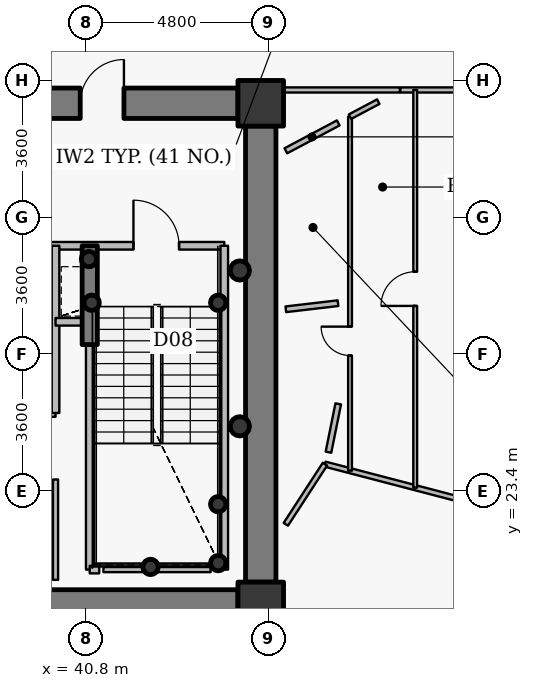
"""IFC4 building model, lengths in metres.
Left out: names, types, materials, properties, quantities, classifications, styles, units other than length and angle.
Written with IfcOpenShell. Run it as: python <this file> out.ifc"""

import sys

from ifc_helpers import new_model, si_unit, direction, frame, frame_2d, origin, origin_2d, place, context, subcontext, project, spatial, rectangle, hollow_circle, extrude, source, transform, mapped, element, fill, save


model = new_model("IFC4")
c1 = context("Model", 3, precision=1e-05, world=origin(), true_north=direction((0.0, 1.0)))
c2 = subcontext(c1, "Body", "Model", "MODEL_VIEW")
j1 = project(units=[si_unit("LENGTHUNIT", "METRE"), si_unit("PLANEANGLEUNIT", "RADIAN")], contexts=[c1])
p1 = place(None, origin())
s1 = spatial("IfcSite", under=j1, at=p1, CompositionType="ELEMENT")
p2 = place(p1, origin())
s2 = spatial("IfcBuilding", under=s1, at=p2, CompositionType="ELEMENT")
p3 = place(p2, frame((0.0, 0.0, 174.9)))
s3 = spatial("IfcBuildingStorey", under=s2, at=p3, CompositionType="ELEMENT", Elevation=174.9)
for number, where, z_axis, x_axis in (
    (1, (45.4, 20.4, 0.0), (0.0, 0.0, 1.0), (1.0, 0.0, 0.0)),
    (2, (45.4, 33.6, 0.0), (0.0, 0.0, 1.0), (1.0, 0.0, 0.0)),
):
    element("IfcColumn", number, at=place(p3, frame(where, z_axis=z_axis, x_axis=x_axis)), inside=s3, PredefinedType="COLUMN", context=c2, shape_type="SweptSolid", body=[
        extrude(rectangle(XDim=1.2, YDim=1.2, at=origin_2d()), origin(), (0.0, 0.0, 1.0), 3.75),
    ])
for number, where, z_axis, x_axis in (
    (3, (44.28, 21.5, 0.0), (0.0, 0.0, 1.0), (1.0, 0.0, 0.0)),
    (4, (44.28, 23.05, 0.0), (0.0, 0.0, 1.0), (1.0, 0.0, 0.0)),
    (5, (42.5, 21.4, 0.0), (0.0, 0.0, 1.0), (1.0, 0.0, 0.0)),
    (6, (40.95, 28.35, 0.0), (0.0, 0.0, 1.0), (1.0, 0.0, 0.0)),
    (7, (44.28, 28.35, 0.0), (0.0, 0.0, 1.0), (1.0, 0.0, 0.0)),
    (8, (40.88, 29.5, 0.0), (0.0, 0.0, 1.0), (1.0, 0.0, 0.0)),
):
    element("IfcColumn", number, at=place(p3, frame(where, z_axis=z_axis, x_axis=x_axis)), inside=s3, PredefinedType="COLUMN", context=c2, shape_type="SweptSolid", body=[
        extrude(hollow_circle(Radius=0.203, WallThickness=0.016, at=origin_2d()), origin(), (0.0, 0.0, 1.0), 3.75),
    ])
p4 = place(p3, frame((27.2, 33.6, 0.0), z_axis=(0.0, 0.0, 1.0), x_axis=(1.0, 0.0, 0.0)))
e9 = element("IfcWall", 9, at=p4, inside=s3, PredefinedType="SHEAR", context=c2, shape_type="SweptSolid", body=[
    extrude(rectangle(XDim=17.6, YDim=0.8, at=frame_2d((8.8, 0.0))), origin(), (0.0, 0.0, 1.0), 2.95),
])
p5 = place(p4, frame((13.45, 0.0, 0.0)))
e10 = element("IfcOpeningElement", 10, at=p5, cuts=e9, PredefinedType="OPENING", context=c2, shape_type="SweptSolid", body=[
    extrude(rectangle(XDim=1.15, YDim=2.15, at=origin_2d()), frame((0.575, 0.41, 1.075), z_axis=(0.0, -1.0, 0.0), x_axis=(1.0, 0.0, 0.0)), (0.0, 0.0, 1.0), 0.82),
])
p6 = place(p3, frame((45.4, 33.0, 0.0), z_axis=(0.0, 0.0, 1.0), x_axis=(0.0, -1.0, 0.0)))
e11 = element("IfcWall", 11, at=p6, inside=s3, PredefinedType="SHEAR", context=c2, shape_type="SweptSolid", body=[
    extrude(rectangle(XDim=12.0, YDim=0.8, at=frame_2d((6.0, 0.0))), origin(), (0.0, 0.0, 1.0), 2.95),
])
p7 = place(p3, frame((44.8, 20.4, 0.0), z_axis=(0.0, 0.0, 1.0), x_axis=(-1.0, 0.0, 0.0)))
e12 = element("IfcWall", 12, at=p7, inside=s3, PredefinedType="SHEAR", context=c2, shape_type="SweptSolid", body=[
    extrude(rectangle(XDim=17.6, YDim=0.8, at=frame_2d((8.8, 0.0))), origin(), (0.0, 0.0, 1.0), 2.95),
])
p8 = place(p7, frame((9.55, 0.0, 0.0)))
e13 = element("IfcOpeningElement", 13, at=p8, cuts=e12, PredefinedType="OPENING", context=c2, shape_type="SweptSolid", body=[
    extrude(rectangle(XDim=1.15, YDim=2.15, at=origin_2d()), frame((0.575, 0.41, 1.075), z_axis=(0.0, -1.0, 0.0), x_axis=(1.0, 0.0, 0.0)), (0.0, 0.0, 1.0), 0.82),
])
p9 = place(p3, frame((40.9, 27.25, 0.0), z_axis=(0.0, 0.0, 1.0), x_axis=(0.0, 1.0, 0.0)))
e14 = element("IfcWall", 14, at=p9, inside=s3, PredefinedType="SHEAR", context=c2, shape_type="SweptSolid", body=[
    extrude(rectangle(XDim=2.6, YDim=0.4, at=frame_2d((1.3, 0.0))), origin(), (0.0, 0.0, 1.0), 3.1),
])
for number, where, z_axis, x_axis in (
    (15, (44.85, 25.1, 0.0), (0.0, 0.0, 1.0), (1.0, 0.0, 0.0)),
    (16, (44.85, 29.2, 0.0), (0.0, 0.0, 1.0), (1.0, 0.0, 0.0)),
):
    element("IfcColumn", number, at=place(p3, frame(where, z_axis=z_axis, x_axis=x_axis)), inside=s3, PredefinedType="COLUMN", context=c2, shape_type="SweptSolid", body=[
        extrude(hollow_circle(Radius=0.254, WallThickness=0.02, at=origin_2d()), origin(), (0.0, 0.0, 1.0), 3.75),
    ])
p10 = place(p3, frame((35.05, 27.25, 0.0), z_axis=(0.0, 0.0, 1.0), x_axis=(1.0, 0.0, 0.0)))
e17 = element("IfcWall", 17, at=p10, inside=s3, PredefinedType="PARTITIONING", context=c2, shape_type="SweptSolid", body=[
    extrude(rectangle(XDim=4.95, YDim=0.2, at=frame_2d((2.475, 0.0))), origin(), (0.0, 0.0, 1.0), 3.085),
])
p11 = place(p3, frame((35.45, 25.45, 0.0), z_axis=(0.0, 0.0, 1.0), x_axis=(1.0, 0.0, 0.0)))
e18 = element("IfcWall", 18, at=p11, inside=s3, PredefinedType="PARTITIONING", context=c2, shape_type="SweptSolid", body=[
    extrude(rectangle(XDim=4.55, YDim=0.2, at=frame_2d((2.275, 0.0))), origin(), (0.0, 0.0, 1.0), 3.085),
])
p12 = place(p3, frame((35.95, 29.85, 0.0), z_axis=(0.0, 0.0, 1.0), x_axis=(1.0, 0.0, 0.0)))
e19 = element("IfcWall", 19, at=p12, inside=s3, PredefinedType="PARTITIONING", context=c2, shape_type="SweptSolid", body=[
    extrude(rectangle(XDim=8.49, YDim=0.2, at=frame_2d((4.245, 0.0))), origin(), (0.0, 0.0, 1.0), 3.085),
])
p13 = place(p12, frame((6.1, 0.0, 0.0)))
e20 = element("IfcOpeningElement", 20, at=p13, cuts=e19, PredefinedType="OPENING", context=c2, shape_type="SweptSolid", body=[
    extrude(rectangle(XDim=1.2, YDim=2.15, at=origin_2d()), frame((0.6, 0.11, 1.075), z_axis=(0.0, -1.0, 0.0), x_axis=(1.0, 0.0, 0.0)), (0.0, 0.0, 1.0), 0.22),
])
p14 = place(p12, frame((0.37, 0.0, 0.0)))
e21 = element("IfcOpeningElement", 21, at=p14, cuts=e19, PredefinedType="OPENING", context=c2, shape_type="SweptSolid", body=[
    extrude(rectangle(XDim=1.15, YDim=2.15, at=origin_2d()), frame((0.575, 0.11, 1.075), z_axis=(0.0, -1.0, 0.0), x_axis=(1.0, 0.0, 0.0)), (0.0, 0.0, 1.0), 0.22),
])
p15 = place(p12, frame((2.425, 0.0, 0.0)))
e22 = element("IfcOpeningElement", 22, at=p15, cuts=e19, PredefinedType="OPENING", context=c2, shape_type="SweptSolid", body=[
    extrude(rectangle(XDim=1.05, YDim=2.15, at=origin_2d()), frame((0.525, 0.11, 1.075), z_axis=(0.0, -1.0, 0.0), x_axis=(1.0, 0.0, 0.0)), (0.0, 0.0, 1.0), 0.22),
])
p16 = place(p3, frame((40.0, 25.45, 0.0), z_axis=(0.0, 0.0, 1.0), x_axis=(0.0, 1.0, 0.0)))
e23 = element("IfcWall", 23, at=p16, inside=s3, PredefinedType="PARTITIONING", context=c2, shape_type="SweptSolid", body=[
    extrude(rectangle(XDim=4.4, YDim=0.2, at=frame_2d((2.2, 0.0))), origin(), (0.0, 0.0, 1.0), 3.5),
])
p17 = place(p3, frame((40.0, 27.85, 0.0), z_axis=(0.0, 0.0, 1.0), x_axis=(1.0, 0.0, 0.0)))
e24 = element("IfcWall", 24, at=p17, inside=s3, PredefinedType="PARTITIONING", context=c2, shape_type="SweptSolid", body=[
    extrude(rectangle(XDim=0.9, YDim=0.2, at=frame_2d((0.45, 0.0))), origin(), (0.0, 0.0, 1.0), 3.5),
])
p18 = place(p3, frame((40.9, 21.33, 0.0), z_axis=(0.0, 0.0, 1.0), x_axis=(0.0, 1.0, 0.0)))
e25 = element("IfcWall", 25, at=p18, inside=s3, PredefinedType="PARTITIONING", context=c2, shape_type="SweptSolid", body=[
    extrude(rectangle(XDim=5.91, YDim=0.2, at=frame_2d((2.955, 0.0))), origin(), (0.0, 0.0, 1.0), 3.035),
])
p19 = place(p3, frame((40.9, 21.33, 0.0), z_axis=(0.0, 0.0, 1.0), x_axis=(1.0, 0.0, 0.0)))
e26 = element("IfcWall", 26, at=p19, inside=s3, PredefinedType="PARTITIONING", context=c2, shape_type="SweptSolid", body=[
    extrude(rectangle(XDim=0.25, YDim=0.2, at=frame_2d((0.125, 0.0))), origin(), (0.0, 0.0, 1.0), 3.035),
])
p20 = place(p3, frame((44.44, 21.33, 0.0), z_axis=(0.0, 0.0, 1.0), x_axis=(0.0, 1.0, 0.0)))
e27 = element("IfcWall", 27, at=p20, inside=s3, PredefinedType="PARTITIONING", context=c2, shape_type="SweptSolid", body=[
    extrude(rectangle(XDim=8.52, YDim=0.2, at=frame_2d((4.26, 0.0))), origin(), (0.0, 0.0, 1.0), 3.5),
])
p21 = place(p3, frame((47.09, 24.105, 0.0), z_axis=(0.0, 0.0, 1.0), x_axis=(0.967573213792, -0.252590728159, 0.0)))
e28 = element("IfcWall", 28, at=p21, inside=s3, PredefinedType="PARTITIONING", context=c2, shape_type="SweptSolid", body=[
    extrude(rectangle(XDim=14.481, YDim=0.135, at=frame_2d((7.24, 0.0))), origin(), (0.0, 0.0, 1.0), 2.935),
])
p22 = place(p3, frame((47.749, 23.933, 0.0), z_axis=(0.0, 0.0, 1.0), x_axis=(0.0, 1.0, 0.0)))
e29 = element("IfcWall", 29, at=p22, inside=s3, PredefinedType="PARTITIONING", context=c2, shape_type="SweptSolid", body=[
    extrude(rectangle(XDim=9.314, YDim=0.1, at=frame_2d((4.657, 0.0))), origin(), (0.0, 0.0, 1.0), 2.935),
])
p23 = place(p22, frame((3.03, 0.0, 0.0)))
e30 = element("IfcOpeningElement", 30, at=p23, cuts=e29, PredefinedType="OPENING", context=c2, shape_type="SweptSolid", body=[
    extrude(rectangle(XDim=0.76, YDim=2.1, at=origin_2d()), frame((0.38, 0.06, 1.05), z_axis=(0.0, -1.0, 0.0), x_axis=(1.0, 0.0, 0.0)), (0.0, 0.0, 1.0), 0.12),
])
p24 = place(p3, frame((49.071, 33.95, 0.0), z_axis=(0.0, 0.0, 1.0), x_axis=(1.0, 0.0, 0.0)))
e31 = element("IfcWall", 31, at=p24, inside=s3, PredefinedType="PARTITIONING", context=c2, shape_type="SweptSolid", body=[
    extrude(rectangle(XDim=5.926, YDim=0.135, at=frame_2d((2.963, 0.0))), origin(), (0.0, 0.0, 1.0), 3.5),
])
p25 = place(p24, frame((2.64, 0.0, 0.0)))
e32 = element("IfcOpeningElement", 32, at=p25, cuts=e31, PredefinedType="OPENING", context=c2, shape_type="SweptSolid", body=[
    extrude(rectangle(XDim=1.0, YDim=2.15, at=origin_2d()), frame((0.5, 0.078, 1.075), z_axis=(0.0, -1.0, 0.0), x_axis=(1.0, 0.0, 0.0)), (0.0, 0.0, 1.0), 0.155),
])
p26 = place(p3, frame((49.464, 23.485, 0.0), z_axis=(0.0, 0.0, 1.0), x_axis=(0.0, 1.0, 0.0)))
e33 = element("IfcWall", 33, at=p26, inside=s3, PredefinedType="PARTITIONING", context=c2, shape_type="SweptSolid", body=[
    extrude(rectangle(XDim=10.465, YDim=0.1, at=frame_2d((5.232, 0.0))), origin(), (0.0, 0.0, 1.0), 2.935),
])
p27 = place(p26, frame((4.783, 0.0, 0.0)))
e34 = element("IfcOpeningElement", 34, at=p27, cuts=e33, PredefinedType="OPENING", context=c2, shape_type="SweptSolid", body=[
    extrude(rectangle(XDim=0.9, YDim=2.1, at=origin_2d()), frame((0.45, 0.06, 1.05), z_axis=(0.0, -1.0, 0.0), x_axis=(1.0, 0.0, 0.0)), (0.0, 0.0, 1.0), 0.12),
])
p28 = place(p3, frame((44.08, 21.33, 0.0), z_axis=(0.0, 0.0, 1.0), x_axis=(-1.0, 0.0, 0.0)))
e35 = element("IfcWall", 35, at=p28, inside=s3, PredefinedType="PARTITIONING", context=c2, shape_type="SweptSolid", body=[
    extrude(rectangle(XDim=2.82, YDim=0.135, at=frame_2d((1.41, 0.0))), origin(), (0.0, 0.0, 1.0), 3.035),
])
p29 = place(p3, frame((40.0, 23.7, 0.0), z_axis=(0.0, 0.0, 1.0), x_axis=(0.0, -1.0, 0.0)))
e36 = element("IfcWall", 36, at=p29, inside=s3, PredefinedType="PARTITIONING", context=c2, shape_type="SweptSolid", body=[
    extrude(rectangle(XDim=2.64, YDim=0.135, at=frame_2d((1.32, 0.0))), origin(), (0.0, 0.0, 1.0), 3.035),
])
p30 = place(p3, frame((49.061, 33.95, 0.0), z_axis=(0.0, 0.0, 1.0), x_axis=(-1.0, 0.0, 0.0)))
e37 = element("IfcWall", 37, at=p30, inside=s3, PredefinedType="PARTITIONING", context=c2, shape_type="SweptSolid", body=[
    extrude(rectangle(XDim=3.261, YDim=0.135, at=frame_2d((1.63, 0.0))), origin(), (0.0, 0.0, 1.0), 3.5),
])
p31 = place(p3, frame((45.79, 34.0, 0.0), z_axis=(0.0, 0.0, 1.0), x_axis=(-1.0, 0.0, 0.0)))
e38 = element("IfcWall", 38, at=p31, inside=s3, PredefinedType="PARTITIONING", context=c2, shape_type="SweptSolid", body=[
    extrude(rectangle(XDim=0.98, YDim=0.135, at=frame_2d((0.49, 0.0))), origin(), (0.0, 0.0, 1.0), 2.935),
])
p32 = place(p3, frame((45.8, 20.377, 0.0), z_axis=(0.0, 0.0, 1.0), x_axis=(0.0, 1.0, 0.0)))
e39 = element("IfcWall", 39, at=p32, inside=s3, PredefinedType="PARTITIONING", context=c2, shape_type="SweptSolid", body=[
    extrude(rectangle(XDim=0.613, YDim=0.135, at=frame_2d((0.306, 0.0))), origin(), (0.0, 0.0, 1.0), 3.5),
])
p33 = place(p3, frame((46.06, 22.521, 0.0), z_axis=(0.0, 0.0, 1.0), x_axis=(0.545329049498, 0.838222063521, 0.0)))
e40 = element("IfcWall", 40, at=p33, inside=s3, PredefinedType="PARTITIONING", context=c2, shape_type="SweptSolid", body=[
    extrude(rectangle(XDim=1.889, YDim=0.135, at=frame_2d((0.944, 0.0))), origin(), (0.0, 0.0, 1.0), 2.935),
])
p34 = place(p3, frame((47.433, 28.34, 0.0), z_axis=(0.0, 0.0, 1.0), x_axis=(-0.993204743367, -0.116380143293, 0.0)))
e41 = element("IfcWall", 41, at=p34, inside=s3, PredefinedType="PARTITIONING", context=c2, shape_type="SweptSolid", body=[
    extrude(rectangle(XDim=1.382, YDim=0.15, at=frame_2d((0.691, 0.0))), origin(), (0.0, 0.0, 1.0), 3.5),
])
p35 = place(p3, frame((46.06, 32.349, 0.0), z_axis=(0.0, 0.0, 1.0), x_axis=(0.882988187469, 0.469395207465, 0.0)))
e42 = element("IfcWall", 42, at=p35, inside=s3, PredefinedType="PARTITIONING", context=c2, shape_type="SweptSolid", body=[
    extrude(rectangle(XDim=1.562, YDim=0.15, at=frame_2d((0.781, 0.0))), origin(), (0.0, 0.0, 1.0), 3.5),
])
p36 = place(p3, frame((47.182, 24.419, 0.0), z_axis=(0.0, 0.0, 1.0), x_axis=(0.198178705385, 0.980165904698, 0.0)))
e43 = element("IfcWall", 43, at=p36, inside=s3, PredefinedType="PARTITIONING", context=c2, shape_type="SweptSolid", body=[
    extrude(rectangle(XDim=1.297, YDim=0.15, at=frame_2d((0.648, 0.0))), origin(), (0.0, 0.0, 1.0), 3.5),
])
p37 = place(p3, frame((47.749, 33.247, 0.0), z_axis=(0.0, 0.0, 1.0), x_axis=(0.882834022315, 0.469685095616, 0.0)))
e44 = element("IfcWall", 44, at=p37, inside=s3, PredefinedType="PARTITIONING", context=c2, shape_type="SweptSolid", body=[
    extrude(rectangle(XDim=0.842, YDim=0.135, at=frame_2d((0.421, 0.0))), origin(), (0.0, 0.0, 1.0), 3.5),
])
m1 = source(origin(), c2, "Body", "SweptSolid", [
    extrude(rectangle(XDim=1.15, YDim=2.15, at=origin_2d()), frame((0.575, 0.025, 1.075), z_axis=(0.0, -1.0, 0.0), x_axis=(1.0, 0.0, 0.0)), (0.0, 0.0, 1.0), 0.05),
])
p38 = place(p5, origin())
e45 = element("IfcDoor", 45, at=p38, inside=s3, OperationType="SINGLE_SWING_RIGHT", PredefinedType="DOOR", context=c2, shape_type="MappedRepresentation", body=[
    mapped(m1, transform((0.0, 0.0, 0.0), x_axis=(1.0, 0.0, 0.0), y_axis=(0.0, 1.0, 0.0), z_axis=(0.0, 0.0, 1.0), scale=1.0)),
])
fill(e10, e45)
m2 = source(origin(), c2, "Body", "SweptSolid", [
    extrude(rectangle(XDim=1.2, YDim=2.15, at=origin_2d()), frame((0.6, 0.025, 1.075), z_axis=(0.0, -1.0, 0.0), x_axis=(1.0, 0.0, 0.0)), (0.0, 0.0, 1.0), 0.05),
])
p39 = place(p13, origin())
e46 = element("IfcDoor", 46, at=p39, inside=s3, OperationType="SINGLE_SWING_LEFT", PredefinedType="DOOR", context=c2, shape_type="MappedRepresentation", body=[
    mapped(m2, transform((0.0, 0.0, 0.0), x_axis=(1.0, 0.0, 0.0), y_axis=(0.0, 1.0, 0.0), z_axis=(0.0, 0.0, 1.0), scale=1.0)),
])
fill(e20, e46)
m3 = source(origin(), c2, "Body", "SweptSolid", [
    extrude(rectangle(XDim=0.9, YDim=2.1, at=origin_2d()), frame((0.45, 0.025, 1.05), z_axis=(0.0, -1.0, 0.0), x_axis=(1.0, 0.0, 0.0)), (0.0, 0.0, 1.0), 0.05),
])
p40 = place(p27, origin())
e47 = element("IfcDoor", 47, at=p40, inside=s3, OperationType="SINGLE_SWING_LEFT", PredefinedType="DOOR", context=c2, shape_type="MappedRepresentation", body=[
    mapped(m3, transform((0.0, 0.0, 0.0), x_axis=(1.0, 0.0, 0.0), y_axis=(0.0, 1.0, 0.0), z_axis=(0.0, 0.0, 1.0), scale=1.0)),
])
fill(e34, e47)
m4 = source(origin(), c2, "Body", "SweptSolid", [
    extrude(rectangle(XDim=0.76, YDim=2.1, at=origin_2d()), frame((0.38, 0.025, 1.05), z_axis=(0.0, -1.0, 0.0), x_axis=(1.0, 0.0, 0.0)), (0.0, 0.0, 1.0), 0.05),
])
p41 = place(p23, origin())
e48 = element("IfcDoor", 48, at=p41, inside=s3, OperationType="SINGLE_SWING_RIGHT", PredefinedType="DOOR", context=c2, shape_type="MappedRepresentation", body=[
    mapped(m4, transform((0.0, 0.0, 0.0), x_axis=(1.0, 0.0, 0.0), y_axis=(0.0, 1.0, 0.0), z_axis=(0.0, 0.0, 1.0), scale=1.0)),
])
fill(e30, e48)
save(model, sys.argv[1])
